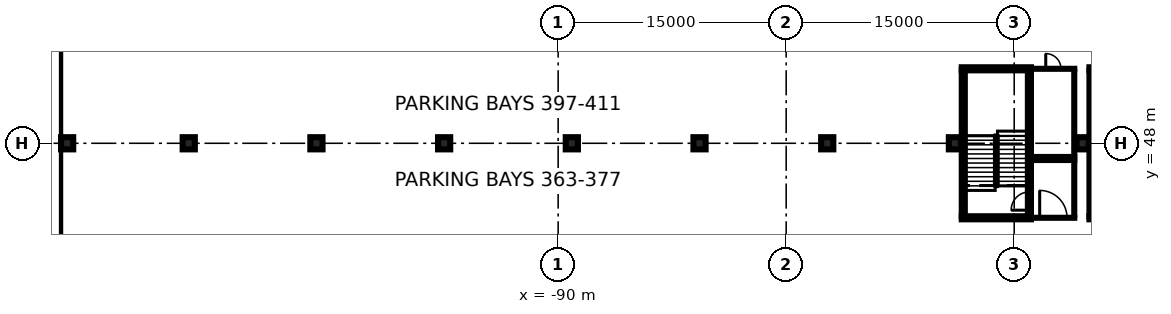
"""IFC4 building model, lengths in metres.
Left out: names, types, materials, properties, quantities, classifications, styles, units other than length and angle.
Written with IfcOpenShell. Run it as: python <this file> out.ifc"""

import sys

from ifc_helpers import new_model, si_unit, direction, frame, frame_2d, origin, origin_2d, place, context, subcontext, project, spatial, rectangle, extrude, element, fill, save


model = new_model("IFC4")
c1 = context("Model", 3, precision=1e-05, world=origin(), true_north=direction((0.0, 1.0)))
c2 = subcontext(c1, "Body", "Model", "MODEL_VIEW")
j1 = project(units=[si_unit("LENGTHUNIT", "METRE"), si_unit("PLANEANGLEUNIT", "RADIAN")], contexts=[c1])
p1 = place(None, origin())
s1 = spatial("IfcSite", under=j1, at=p1, CompositionType="ELEMENT")
p2 = place(p1, origin())
s2 = spatial("IfcBuilding", under=s1, at=p2, CompositionType="ELEMENT")
p3 = place(p2, frame((0.0, 0.0, -12.0)))
s3 = spatial("IfcBuildingStorey", under=s2, at=p3, CompositionType="ELEMENT", Elevation=-12.0)
p4 = place(p3, frame((-123.15, -80.0, 0.0), z_axis=(0.0, 0.0, 1.0), x_axis=(0.0, 1.0, 0.0)))
e1 = element("IfcWall", 1, at=p4, inside=s3, PredefinedType="USERDEFINED", context=c2, shape_type="SweptSolid", body=[
    extrude(rectangle(XDim=160.0, YDim=0.9, at=frame_2d((80.0, 0.0))), origin(), (0.0, 0.0, 1.0), 11.55),
])
p5 = place(p2, frame((0.0, 0.0, -3.6)))
s4 = spatial("IfcBuildingStorey", under=s2, at=p5, CompositionType="ELEMENT", Elevation=-3.6)
for number, where, z_axis, x_axis in (
    (2, (-122.3, 48.0, -0.4), (0.0, 0.0, 1.0), (1.0, 0.0, 0.0)),
    (3, (-114.3, 48.0, -0.4), (0.0, 0.0, 1.0), (1.0, 0.0, 0.0)),
    (4, (-105.9, 48.0, -0.4), (0.0, 0.0, 1.0), (1.0, 0.0, 0.0)),
    (5, (-97.5, 48.0, -0.4), (0.0, 0.0, 1.0), (1.0, 0.0, 0.0)),
    (6, (-89.1, 48.0, -0.4), (0.0, 0.0, 1.0), (1.0, 0.0, 0.0)),
    (7, (-80.7, 48.0, -0.4), (0.0, 0.0, 1.0), (1.0, 0.0, 0.0)),
    (8, (-72.3, 48.0, -0.4), (0.0, 0.0, 1.0), (1.0, 0.0, 0.0)),
    (9, (-63.9, 48.0, -0.4), (0.0, 0.0, 1.0), (1.0, 0.0, 0.0)),
    (10, (-55.5, 48.0, -0.4), (0.0, 0.0, 1.0), (1.0, 0.0, 0.0)),
):
    element("IfcColumn", number, at=place(p5, frame(where, z_axis=z_axis, x_axis=x_axis)), inside=s4, PredefinedType="COLUMN", context=c2, shape_type="SweptSolid", body=[
        extrude(rectangle(XDim=0.8, YDim=0.8, at=origin_2d()), origin(), (0.0, 0.0, 1.0), 3.55),
    ])
p6 = place(p5, frame((-58.9, 43.1, 0.0), z_axis=(0.0, 0.0, 1.0), x_axis=(1.0, 0.0, 0.0)))
e11 = element("IfcWall", 11, at=p6, inside=s4, PredefinedType="PARTITIONING", context=c2, shape_type="SweptSolid", body=[
    extrude(rectangle(XDim=2.95, YDim=0.2, at=frame_2d((1.475, 0.0))), origin(), (0.0, 0.0, 1.0), 3.15),
])
p7 = place(p6, frame((0.575, 0.0, 0.0)))
e12 = element("IfcOpeningElement", 12, at=p7, cuts=e11, PredefinedType="OPENING", context=c2, shape_type="SweptSolid", body=[
    extrude(rectangle(XDim=1.8, YDim=2.1, at=frame_2d((0.9, 1.05))), frame((0.0, 0.11, 0.0), z_axis=(0.0, -1.0, 0.0), x_axis=(1.0, 0.0, 0.0)), (0.0, 0.0, 1.0), 0.22),
])
p8 = place(p5, frame((-58.9, 46.9, 0.0), z_axis=(0.0, 0.0, 1.0), x_axis=(1.0, 0.0, 0.0)))
e13 = element("IfcWall", 13, at=p8, inside=s4, PredefinedType="PARTITIONING", context=c2, shape_type="SweptSolid", body=[
    extrude(rectangle(XDim=2.95, YDim=0.2, at=frame_2d((1.475, 0.0))), origin(), (0.0, 0.0, 1.0), 3.15),
])
p9 = place(p5, frame((-56.05, 43.2, 0.0), z_axis=(0.0, 0.0, 1.0), x_axis=(0.0, 1.0, 0.0)))
e14 = element("IfcWall", 14, at=p9, inside=s4, PredefinedType="PARTITIONING", context=c2, shape_type="SweptSolid", body=[
    extrude(rectangle(XDim=3.6, YDim=0.2, at=frame_2d((1.8, 0.0))), origin(), (0.0, 0.0, 1.0), 3.15),
])
p10 = place(p5, frame((-58.9, 47.1, 0.0), z_axis=(0.0, 0.0, 1.0), x_axis=(1.0, 0.0, 0.0)))
e15 = element("IfcWall", 15, at=p10, inside=s4, PredefinedType="PARTITIONING", context=c2, shape_type="SweptSolid", body=[
    extrude(rectangle(XDim=2.95, YDim=0.2, at=frame_2d((1.475, 0.0))), origin(), (0.0, 0.0, 1.0), 3.15),
])
p11 = place(p5, frame((-58.9, 52.9, 0.0), z_axis=(0.0, 0.0, 1.0), x_axis=(1.0, 0.0, 0.0)))
e16 = element("IfcWall", 16, at=p11, inside=s4, PredefinedType="PARTITIONING", context=c2, shape_type="SweptSolid", body=[
    extrude(rectangle(XDim=2.95, YDim=0.2, at=frame_2d((1.475, 0.0))), origin(), (0.0, 0.0, 1.0), 3.15),
])
p12 = place(p11, frame((0.975, 0.0, 0.0)))
e17 = element("IfcOpeningElement", 17, at=p12, cuts=e16, PredefinedType="OPENING", context=c2, shape_type="SweptSolid", body=[
    extrude(rectangle(XDim=1.0, YDim=2.1, at=frame_2d((0.5, 1.05))), frame((0.0, 0.11, 0.0), z_axis=(0.0, -1.0, 0.0), x_axis=(1.0, 0.0, 0.0)), (0.0, 0.0, 1.0), 0.22),
])
p13 = place(p5, frame((-56.05, 47.2, 0.0), z_axis=(0.0, 0.0, 1.0), x_axis=(0.0, 1.0, 0.0)))
e18 = element("IfcWall", 18, at=p13, inside=s4, PredefinedType="PARTITIONING", context=c2, shape_type="SweptSolid", body=[
    extrude(rectangle(XDim=5.6, YDim=0.2, at=frame_2d((2.8, 0.0))), origin(), (0.0, 0.0, 1.0), 3.15),
])
p14 = place(p5, frame((-63.35, 43.2, 0.0), z_axis=(0.0, 0.0, 1.0), x_axis=(0.0, 1.0, 0.0)))
e19 = element("IfcWall", 19, at=p14, inside=s4, PredefinedType="SOLIDWALL", context=c2, shape_type="SweptSolid", body=[
    extrude(rectangle(XDim=9.6, YDim=0.2, at=frame_2d((4.8, 0.0))), origin(), (0.0, 0.0, 1.0), 3.15),
])
p15 = place(p5, frame((-59.0, 43.2, 0.0), z_axis=(0.0, 0.0, 1.0), x_axis=(0.0, 1.0, 0.0)))
e20 = element("IfcWall", 20, at=p15, inside=s4, PredefinedType="SOLIDWALL", context=c2, shape_type="SweptSolid", body=[
    extrude(rectangle(XDim=9.6, YDim=0.2, at=frame_2d((4.8, 0.0))), origin(), (0.0, 0.0, 1.0), 3.15),
])
p16 = place(p15, frame((0.4, 0.0, 0.0)))
e21 = element("IfcOpeningElement", 21, at=p16, cuts=e20, PredefinedType="OPENING", context=c2, shape_type="SweptSolid", body=[
    extrude(rectangle(XDim=1.2, YDim=2.1, at=frame_2d((0.6, 1.05))), frame((0.0, 0.11, 0.0), z_axis=(0.0, -1.0, 0.0), x_axis=(1.0, 0.0, 0.0)), (0.0, 0.0, 1.0), 0.22),
])
for number, where, z_axis, x_axis in (
    (22, (-58.9, 43.1, 0.0), (0.0, 0.0, 1.0), (-1.0, 0.0, 0.0)),
    (23, (-63.45, 52.9, 0.0), (0.0, 0.0, 1.0), (1.0, 0.0, 0.0)),
):
    element("IfcWall", number, at=place(p5, frame(where, z_axis=z_axis, x_axis=x_axis)), inside=s4, PredefinedType="SOLIDWALL", context=c2, shape_type="SweptSolid", body=[
        extrude(rectangle(XDim=4.55, YDim=0.2, at=frame_2d((2.275, 0.0))), origin(), (0.0, 0.0, 1.0), 3.15),
    ])
p17 = place(p5, frame((-54.95, 43.2, 0.0), z_axis=(0.0, 0.0, 1.0), x_axis=(0.0, 1.0, 0.0)))
e24 = element("IfcWall", 24, at=p17, inside=s4, PredefinedType="SOLIDWALL", context=c2, shape_type="SweptSolid", body=[
    extrude(rectangle(XDim=9.6, YDim=0.2, at=frame_2d((4.8, 0.0))), origin(), (0.0, 0.0, 1.0), 3.15),
])
for number, where, z_axis, x_axis in (
    (25, (-50.5, 43.1, 0.0), (0.0, 0.0, 1.0), (-1.0, 0.0, 0.0)),
    (26, (-55.05, 52.9, 0.0), (0.0, 0.0, 1.0), (1.0, 0.0, 0.0)),
):
    element("IfcWall", number, at=place(p5, frame(where, z_axis=z_axis, x_axis=x_axis)), inside=s4, PredefinedType="SOLIDWALL", context=c2, shape_type="SweptSolid", body=[
        extrude(rectangle(XDim=4.55, YDim=0.2, at=frame_2d((2.275, 0.0))), origin(), (0.0, 0.0, 1.0), 3.15),
    ])
p18 = place(p7, origin())
e27 = element("IfcDoor", 27, at=p18, inside=s4, OperationType="DOUBLE_DOOR_SINGLE_SWING", PredefinedType="DOOR", context=c2, shape_type="SweptSolid", body=[
    extrude(rectangle(XDim=1.8, YDim=2.1, at=frame_2d((0.9, 1.05))), frame((0.0, 0.025, 0.0), z_axis=(0.0, -1.0, 0.0), x_axis=(1.0, 0.0, 0.0)), (0.0, 0.0, 1.0), 0.05),
])
fill(e12, e27)
p19 = place(p12, origin())
e28 = element("IfcDoor", 28, at=p19, inside=s4, OperationType="SINGLE_SWING_LEFT", PredefinedType="DOOR", context=c2, shape_type="SweptSolid", body=[
    extrude(rectangle(XDim=1.0, YDim=2.1, at=frame_2d((0.5, 1.05))), frame((0.0, 0.025, 0.0), z_axis=(0.0, -1.0, 0.0), x_axis=(1.0, 0.0, 0.0)), (0.0, 0.0, 1.0), 0.05),
])
fill(e17, e28)
p20 = place(p16, origin())
e29 = element("IfcDoor", 29, at=p20, inside=s4, OperationType="SINGLE_SWING_LEFT", PredefinedType="DOOR", context=c2, shape_type="SweptSolid", body=[
    extrude(rectangle(XDim=1.2, YDim=2.1, at=frame_2d((0.6, 1.05))), frame((0.0, 0.025, 0.0), z_axis=(0.0, -1.0, 0.0), x_axis=(1.0, 0.0, 0.0)), (0.0, 0.0, 1.0), 0.05),
])
fill(e21, e29)
save(model, sys.argv[1])
